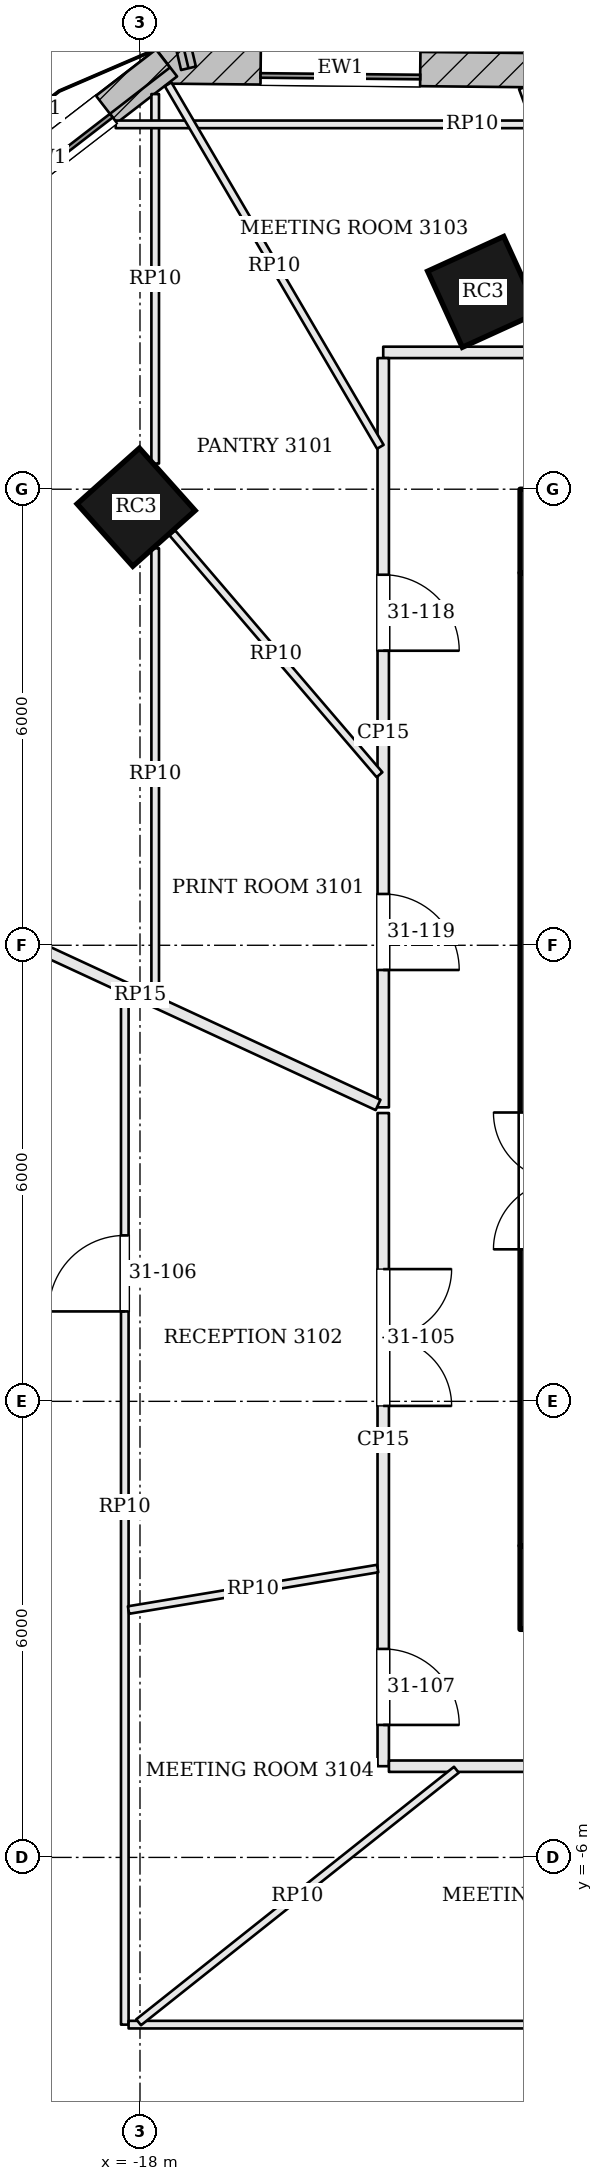
"""IFC4 building model, lengths in metres.
Left out: names, types, materials, properties, quantities, classifications, styles, units other than length and angle.
Written with IfcOpenShell. Run it as: python <this file> out.ifc"""

import sys

from ifc_helpers import new_model, si_unit, direction, frame, frame_2d, origin, origin_2d, place, context, subcontext, project, spatial, rectangle, extrude, element, fill, save


model = new_model("IFC4")
c1 = context("Model", 3, precision=1e-05, world=origin(), true_north=direction((0.0, 1.0)))
c2 = subcontext(c1, "Body", "Model", "MODEL_VIEW")
j1 = project(units=[si_unit("LENGTHUNIT", "METRE"), si_unit("PLANEANGLEUNIT", "RADIAN")], contexts=[c1])
p1 = place(None, origin())
s1 = spatial("IfcSite", under=j1, at=p1, CompositionType="ELEMENT")
p2 = place(p1, origin())
s2 = spatial("IfcBuilding", under=s1, at=p2, CompositionType="ELEMENT")
p3 = place(p2, frame((0.0, 0.0, 130.5)))
s3 = spatial("IfcBuildingStorey", under=s2, at=p3, CompositionType="ELEMENT", Elevation=130.5)
p4 = place(p3, frame((-13.0, 11.45, 0.0), z_axis=(0.0, 0.0, 1.0), x_axis=(1.0, 0.0, 0.0)))
e1 = element("IfcWall", 1, at=p4, inside=s3, PredefinedType="SHEAR", context=c2, shape_type="SweptSolid", body=[
    extrude(rectangle(XDim=26.0, YDim=1.1, at=frame_2d((13.0, 0.0))), origin(), (0.0, 0.0, 1.0), 3.9),
])
p5 = place(p4, frame((9.65, 0.0, 0.0)))
e2 = element("IfcOpeningElement", 2, at=p5, cuts=e1, PredefinedType="OPENING", context=c2, shape_type="SweptSolid", body=[
    extrude(rectangle(XDim=1.0, YDim=2.1, at=frame_2d((0.5, 1.05))), frame((0.0, 0.56, 0.0), z_axis=(0.0, -1.0, 0.0), x_axis=(1.0, 0.0, 0.0)), (0.0, 0.0, 1.0), 1.12),
])
p6 = place(p4, frame((12.675, 0.0, 0.0)))
e3 = element("IfcOpeningElement", 3, at=p6, cuts=e1, PredefinedType="OPENING", context=c2, shape_type="SweptSolid", body=[
    extrude(rectangle(XDim=0.7, YDim=2.1, at=frame_2d((0.35, 1.05))), frame((0.0, 0.56, 0.0), z_axis=(0.0, -1.0, 0.0), x_axis=(1.0, 0.0, 0.0)), (0.0, 0.0, 1.0), 1.12),
])
p7 = place(p4, frame((14.725, 0.0, 0.0)))
e4 = element("IfcOpeningElement", 4, at=p7, cuts=e1, PredefinedType="OPENING", context=c2, shape_type="SweptSolid", body=[
    extrude(rectangle(XDim=0.7, YDim=2.1, at=frame_2d((0.35, 1.05))), frame((0.0, 0.56, 0.0), z_axis=(0.0, -1.0, 0.0), x_axis=(1.0, 0.0, 0.0)), (0.0, 0.0, 1.0), 1.12),
])
p8 = place(p4, frame((16.6, 0.0, 0.0)))
e5 = element("IfcOpeningElement", 5, at=p8, cuts=e1, PredefinedType="OPENING", context=c2, shape_type="SweptSolid", body=[
    extrude(rectangle(XDim=1.0, YDim=2.1, at=frame_2d((0.5, 1.05))), frame((0.0, 0.56, 0.0), z_axis=(0.0, -1.0, 0.0), x_axis=(1.0, 0.0, 0.0)), (0.0, 0.0, 1.0), 1.12),
])
p9 = place(p3, frame((-13.0, -2.45, 0.0), z_axis=(0.0, 0.0, 1.0), x_axis=(1.0, 0.0, 0.0)))
e6 = element("IfcWall", 6, at=p9, inside=s3, PredefinedType="SHEAR", context=c2, shape_type="SweptSolid", body=[
    extrude(rectangle(XDim=26.0, YDim=1.1, at=frame_2d((13.0, 0.0))), origin(), (0.0, 0.0, 1.0), 3.9),
])
p10 = place(p9, frame((9.2, 0.0, 0.0)))
e7 = element("IfcOpeningElement", 7, at=p10, cuts=e6, PredefinedType="OPENING", context=c2, shape_type="SweptSolid", body=[
    extrude(rectangle(XDim=0.9, YDim=2.1, at=frame_2d((0.45, 1.05))), frame((0.0, 0.56, 0.0), z_axis=(0.0, -1.0, 0.0), x_axis=(1.0, 0.0, 0.0)), (0.0, 0.0, 1.0), 1.12),
])
p11 = place(p9, frame((12.3, 0.0, 0.0)))
e8 = element("IfcOpeningElement", 8, at=p11, cuts=e6, PredefinedType="OPENING", context=c2, shape_type="SweptSolid", body=[
    extrude(rectangle(XDim=0.9, YDim=2.1, at=frame_2d((0.45, 1.05))), frame((0.0, 0.56, 0.0), z_axis=(0.0, -1.0, 0.0), x_axis=(1.0, 0.0, 0.0)), (0.0, 0.0, 1.0), 1.12),
])
p12 = place(p9, frame((14.7, 0.0, 0.0)))
e9 = element("IfcOpeningElement", 9, at=p12, cuts=e6, PredefinedType="OPENING", context=c2, shape_type="SweptSolid", body=[
    extrude(rectangle(XDim=1.0, YDim=2.1, at=frame_2d((0.5, 1.05))), frame((0.0, 0.56, 0.0), z_axis=(0.0, -1.0, 0.0), x_axis=(1.0, 0.0, 0.0)), (0.0, 0.0, 1.0), 1.12),
])
p13 = place(p9, frame((16.55, 0.0, 0.0)))
e10 = element("IfcOpeningElement", 10, at=p13, cuts=e6, PredefinedType="OPENING", context=c2, shape_type="SweptSolid", body=[
    extrude(rectangle(XDim=0.9, YDim=2.1, at=frame_2d((0.45, 1.05))), frame((0.0, 0.56, 0.0), z_axis=(0.0, -1.0, 0.0), x_axis=(1.0, 0.0, 0.0)), (0.0, 0.0, 1.0), 1.12),
])
p14 = place(p3, frame((-12.45, -1.9, 0.0), z_axis=(0.0, 0.0, 1.0), x_axis=(0.0, 1.0, 0.0)))
e11 = element("IfcWall", 11, at=p14, inside=s3, PredefinedType="SHEAR", context=c2, shape_type="SweptSolid", body=[
    extrude(rectangle(XDim=12.8, YDim=1.1, at=frame_2d((6.4, 0.0))), origin(), (0.0, 0.0, 1.0), 3.9),
])
p15 = place(p14, frame((3.9, 0.0, 0.0)))
e12 = element("IfcOpeningElement", 12, at=p15, cuts=e11, PredefinedType="OPENING", context=c2, shape_type="SweptSolid", body=[
    extrude(rectangle(XDim=1.8, YDim=2.1, at=frame_2d((0.9, 1.05))), frame((0.0, 0.56, 0.0), z_axis=(0.0, -1.0, 0.0), x_axis=(1.0, 0.0, 0.0)), (0.0, 0.0, 1.0), 1.12),
])
for number, where, z_axis, x_axis in (
    (13, (-13.487, 14.596, 0.0), (0.0, 0.0, 1.0), (-0.91, -0.415, 0.0)),
    (14, (-18.051, 11.763, 0.0), (0.0, 0.0, 1.0), (-0.746, -0.666, 0.0)),
):
    element("IfcColumn", number, at=place(p3, frame(where, z_axis=z_axis, x_axis=x_axis)), inside=s3, PredefinedType="COLUMN", context=c2, shape_type="SweptSolid", body=[
        extrude(rectangle(XDim=1.1, YDim=1.1, at=origin_2d()), origin(), (0.0, 0.0, 1.0), 3.9),
    ])
p16 = place(p3, frame((-8.807, 17.008, 0.0), z_axis=(0.0, 0.0, 1.0), x_axis=(-0.992654419289, 0.120984312483, 0.0)))
e15 = element("IfcWall", 15, at=p16, inside=s3, PredefinedType="SOLIDWALL", context=c2, shape_type="SweptSolid", body=[
    extrude(rectangle(XDim=4.187, YDim=0.45, at=frame_2d((2.094, 0.0))), origin(), (0.0, 0.0, 1.0), 3.7),
])
p17 = place(p16, frame((1.044, 0.0, 0.9)))
e16 = element("IfcOpeningElement", 16, at=p17, cuts=e15, PredefinedType="OPENING", context=c2, shape_type="SweptSolid", body=[
    extrude(rectangle(XDim=2.1, YDim=2.3, at=frame_2d((1.05, 1.15))), frame((0.0, 0.235, 0.0), z_axis=(0.0, -1.0, 0.0), x_axis=(1.0, 0.0, 0.0)), (0.0, 0.0, 1.0), 0.47),
])
p18 = place(p3, frame((-12.939, 17.514, 0.0), z_axis=(0.0, 0.0, 1.0), x_axis=(-0.999950280333, 0.00997180335, 0.0)))
e17 = element("IfcWall", 17, at=p18, inside=s3, PredefinedType="SOLIDWALL", context=c2, shape_type="SweptSolid", body=[
    extrude(rectangle(XDim=4.848, YDim=0.45, at=frame_2d((2.424, 0.0))), origin(), (0.0, 0.0, 1.0), 3.7),
])
p19 = place(p18, frame((1.374, 0.0, 0.9)))
e18 = element("IfcOpeningElement", 18, at=p19, cuts=e17, PredefinedType="OPENING", context=c2, shape_type="SweptSolid", body=[
    extrude(rectangle(XDim=2.1, YDim=2.3, at=frame_2d((1.05, 1.15))), frame((0.0, 0.235, 0.0), z_axis=(0.0, -1.0, 0.0), x_axis=(1.0, 0.0, 0.0)), (0.0, 0.0, 1.0), 0.47),
])
p20 = place(p3, frame((-17.649, 17.609, 0.0), z_axis=(0.0, 0.0, 1.0), x_axis=(-0.791693388686, -0.610918634771, 0.0)))
e19 = element("IfcWall", 19, at=p20, inside=s3, PredefinedType="SOLIDWALL", context=c2, shape_type="SweptSolid", body=[
    extrude(rectangle(XDim=4.1, YDim=0.45, at=frame_2d((2.05, 0.0))), origin(), (0.0, 0.0, 1.0), 3.7),
])
p21 = place(p20, frame((1.0, 0.0, 0.9)))
e20 = element("IfcOpeningElement", 20, at=p21, cuts=e19, PredefinedType="OPENING", context=c2, shape_type="SweptSolid", body=[
    extrude(rectangle(XDim=2.1, YDim=2.3, at=frame_2d((1.05, 1.15))), frame((0.0, 0.235, 0.0), z_axis=(0.0, -1.0, 0.0), x_axis=(1.0, 0.0, 0.0)), (0.0, 0.0, 1.0), 0.47),
])
p22 = place(p3, frame((-17.362, 17.538, 0.0), z_axis=(0.0, 0.0, 1.0), x_axis=(-0.230469860183, 0.973079464148, 0.0)))
e21 = element("IfcWall", 21, at=p22, inside=s3, PredefinedType="SOLIDWALL", context=c2, shape_type="SweptSolid", body=[
    extrude(rectangle(XDim=1.75, YDim=0.2, at=frame_2d((0.875, 0.0))), origin(), (0.0, 0.0, 1.0), 3.7),
])
p23 = place(p3, frame((-17.698, 17.666, 3.9), z_axis=(0.0, 0.0, 1.0), x_axis=(-0.791652356246, -0.610971805282, 0.0)))
e22 = element("IfcWall", 22, at=p23, inside=s3, PredefinedType="PARAPET", context=c2, shape_type="SweptSolid", body=[
    extrude(rectangle(XDim=3.974, YDim=0.3, at=frame_2d((1.987, 0.0))), origin(), (0.0, 0.0, 1.0), 1.1),
])
p24 = place(p3, frame((5.559, 13.8, 0.0), z_axis=(0.0, 0.0, 1.0), x_axis=(-1.0, 0.0, 0.0)))
e23 = element("IfcWall", 23, at=p24, inside=s3, PredefinedType="PARTITIONING", context=c2, shape_type="SweptSolid", body=[
    extrude(rectangle(XDim=20.359, YDim=0.15, at=frame_2d((10.18, 0.0))), origin(), (0.0, 0.0, 1.0), 3.198),
])
p25 = place(p24, frame((3.204, 0.0, 0.0)))
e24 = element("IfcOpeningElement", 24, at=p25, cuts=e23, PredefinedType="OPENING", context=c2, shape_type="SweptSolid", body=[
    extrude(rectangle(XDim=1.8, YDim=2.1, at=frame_2d((0.9, 1.05))), frame((0.0, 0.085, 0.0), z_axis=(0.0, -1.0, 0.0), x_axis=(1.0, 0.0, 0.0)), (0.0, 0.0, 1.0), 0.17),
])
p26 = place(p24, frame((8.995, 0.0, 0.0)))
e25 = element("IfcOpeningElement", 25, at=p26, cuts=e23, PredefinedType="OPENING", context=c2, shape_type="SweptSolid", body=[
    extrude(rectangle(XDim=1.0, YDim=2.4, at=frame_2d((0.5, 1.2))), frame((0.0, 0.085, 0.0), z_axis=(0.0, -1.0, 0.0), x_axis=(1.0, 0.0, 0.0)), (0.0, 0.0, 1.0), 0.17),
])
p27 = place(p24, frame((13.511, 0.0, 0.0)))
e26 = element("IfcOpeningElement", 26, at=p27, cuts=e23, PredefinedType="OPENING", context=c2, shape_type="SweptSolid", body=[
    extrude(rectangle(XDim=1.0, YDim=2.4, at=frame_2d((0.5, 1.2))), frame((0.0, 0.085, 0.0), z_axis=(0.0, -1.0, 0.0), x_axis=(1.0, 0.0, 0.0)), (0.0, 0.0, 1.0), 0.17),
])
p28 = place(p24, frame((17.45, 0.0, 0.0)))
e27 = element("IfcOpeningElement", 27, at=p28, cuts=e23, PredefinedType="OPENING", context=c2, shape_type="SweptSolid", body=[
    extrude(rectangle(XDim=0.8, YDim=2.1, at=frame_2d((0.4, 1.05))), frame((0.0, 0.085, 0.0), z_axis=(0.0, -1.0, 0.0), x_axis=(1.0, 0.0, 0.0)), (0.0, 0.0, 1.0), 0.17),
])
p29 = place(p3, frame((-14.8, 13.725, 0.0), z_axis=(0.0, 0.0, 1.0), x_axis=(0.0, -1.0, 0.0)))
e28 = element("IfcWall", 28, at=p29, inside=s3, PredefinedType="PARTITIONING", context=c2, shape_type="SweptSolid", body=[
    extrude(rectangle(XDim=9.857, YDim=0.15, at=frame_2d((4.929, 0.0))), origin(), (0.0, 0.0, 1.0), 3.198),
])
p30 = place(p29, frame((2.85, 0.0, 0.0)))
e29 = element("IfcOpeningElement", 29, at=p30, cuts=e28, PredefinedType="OPENING", context=c2, shape_type="SweptSolid", body=[
    extrude(rectangle(XDim=1.0, YDim=2.1, at=frame_2d((0.5, 1.05))), frame((0.0, 0.085, 0.0), z_axis=(0.0, -1.0, 0.0), x_axis=(1.0, 0.0, 0.0)), (0.0, 0.0, 1.0), 0.17),
])
p31 = place(p29, frame((7.05, 0.0, 0.0)))
e30 = element("IfcOpeningElement", 30, at=p31, cuts=e28, PredefinedType="OPENING", context=c2, shape_type="SweptSolid", body=[
    extrude(rectangle(XDim=1.0, YDim=2.1, at=frame_2d((0.5, 1.05))), frame((0.0, 0.085, 0.0), z_axis=(0.0, -1.0, 0.0), x_axis=(1.0, 0.0, 0.0)), (0.0, 0.0, 1.0), 0.17),
])
p32 = place(p3, frame((-21.125, 6.795, 0.0), z_axis=(0.0, 0.0, 1.0), x_axis=(0.907525653009, -0.419996653713, 0.0)))
e31 = element("IfcWall", 31, at=p32, inside=s3, PredefinedType="PARTITIONING", context=c2, shape_type="SweptSolid", body=[
    extrude(rectangle(XDim=6.894, YDim=0.15, at=frame_2d((3.447, 0.0))), origin(), (0.0, 0.0, 1.0), 3.198),
])
p33 = place(p3, frame((-14.8, 3.793, 0.0), z_axis=(0.0, 0.0, 1.0), x_axis=(0.0, -1.0, 0.0)))
e32 = element("IfcWall", 32, at=p33, inside=s3, PredefinedType="PARTITIONING", context=c2, shape_type="SweptSolid", body=[
    extrude(rectangle(XDim=8.593, YDim=0.15, at=frame_2d((4.296, 0.0))), origin(), (0.0, 0.0, 1.0), 3.198),
])
p34 = place(p33, frame((2.053, 0.0, 0.0)))
e33 = element("IfcOpeningElement", 33, at=p34, cuts=e32, PredefinedType="OPENING", context=c2, shape_type="SweptSolid", body=[
    extrude(rectangle(XDim=1.8, YDim=2.1, at=frame_2d((0.9, 1.05))), frame((0.0, 0.085, 0.0), z_axis=(0.0, -1.0, 0.0), x_axis=(1.0, 0.0, 0.0)), (0.0, 0.0, 1.0), 0.17),
])
p35 = place(p33, frame((7.05, 0.0, 0.0)))
e34 = element("IfcOpeningElement", 34, at=p35, cuts=e32, PredefinedType="OPENING", context=c2, shape_type="SweptSolid", body=[
    extrude(rectangle(XDim=1.0, YDim=2.4, at=frame_2d((0.5, 1.2))), frame((0.0, 0.085, 0.0), z_axis=(0.0, -1.0, 0.0), x_axis=(1.0, 0.0, 0.0)), (0.0, 0.0, 1.0), 0.17),
])
p36 = place(p3, frame((-14.725, -4.8, 0.0), z_axis=(0.0, 0.0, 1.0), x_axis=(1.0, 0.0, 0.0)))
e35 = element("IfcWall", 35, at=p36, inside=s3, PredefinedType="PARTITIONING", context=c2, shape_type="SweptSolid", body=[
    extrude(rectangle(XDim=10.185, YDim=0.15, at=frame_2d((5.092, 0.0))), origin(), (0.0, 0.0, 1.0), 3.198),
])
p37 = place(p36, frame((3.093, 0.0, 0.0)))
e36 = element("IfcOpeningElement", 36, at=p37, cuts=e35, PredefinedType="OPENING", context=c2, shape_type="SweptSolid", body=[
    extrude(rectangle(XDim=1.0, YDim=2.4, at=frame_2d((0.5, 1.2))), frame((0.0, 0.085, 0.0), z_axis=(0.0, -1.0, 0.0), x_axis=(1.0, 0.0, 0.0)), (0.0, 0.0, 1.0), 0.17),
])
p38 = place(p3, frame((-17.8, 5.278, 0.0), z_axis=(0.0, 0.0, 1.0), x_axis=(0.0, 1.0, 0.0)))
e37 = element("IfcWall", 37, at=p38, inside=s3, PredefinedType="PARTITIONING", context=c2, shape_type="SweptSolid", body=[
    extrude(rectangle(XDim=5.945, YDim=0.1, at=frame_2d((2.972, 0.0))), origin(), (0.0, 0.0, 1.0), 3.184),
])
p39 = place(p3, frame((-17.8, 12.337, 0.0), z_axis=(0.0, 0.0, 1.0), x_axis=(0.0, 1.0, 0.0)))
e38 = element("IfcWall", 38, at=p39, inside=s3, PredefinedType="PARTITIONING", context=c2, shape_type="SweptSolid", body=[
    extrude(rectangle(XDim=4.861, YDim=0.1, at=frame_2d((2.431, 0.0))), origin(), (0.0, 0.0, 1.0), 3.184),
])
p40 = place(p3, frame((-18.319, 16.8, 0.0), z_axis=(0.0, 0.0, 1.0), x_axis=(1.0, 0.0, 0.0)))
e39 = element("IfcWall", 39, at=p40, inside=s3, PredefinedType="PARTITIONING", context=c2, shape_type="SweptSolid", body=[
    extrude(rectangle(XDim=9.381, YDim=0.1, at=frame_2d((4.69, 0.0))), origin(), (0.0, 0.0, 1.0), 3.184),
])
p41 = place(p3, frame((-11.707, 13.87, 0.0), z_axis=(0.0, 0.0, 1.0), x_axis=(-0.346436838334, 0.938073300465, 0.0)))
e40 = element("IfcWall", 40, at=p41, inside=s3, PredefinedType="PARTITIONING", context=c2, shape_type="SweptSolid", body=[
    extrude(rectangle(XDim=3.634, YDim=0.1, at=frame_2d((1.817, 0.0))), origin(), (0.0, 0.0, 1.0), 3.184),
])
p42 = place(p3, frame((-14.838, 12.558, 0.0), z_axis=(0.0, 0.0, 1.0), x_axis=(-0.505293152316, 0.862947756369, 0.0)))
e41 = element("IfcWall", 41, at=p42, inside=s3, PredefinedType="PARTITIONING", context=c2, shape_type="SweptSolid", body=[
    extrude(rectangle(XDim=5.526, YDim=0.1, at=frame_2d((2.763, 0.0))), origin(), (0.0, 0.0, 1.0), 3.184),
])
p43 = place(p3, frame((-14.849, 8.244, 0.0), z_axis=(0.0, 0.0, 1.0), x_axis=(-0.650724168588, 0.759314201379, 0.0)))
e42 = element("IfcWall", 42, at=p43, inside=s3, PredefinedType="PARTITIONING", context=c2, shape_type="SweptSolid", body=[
    extrude(rectangle(XDim=4.188, YDim=0.1, at=frame_2d((2.094, 0.0))), origin(), (0.0, 0.0, 1.0), 3.184),
])
p44 = place(p3, frame((-18.2, -8.2, 0.0), z_axis=(0.0, 0.0, 1.0), x_axis=(0.0, 1.0, 0.0)))
e43 = element("IfcWall", 43, at=p44, inside=s3, PredefinedType="PARTITIONING", context=c2, shape_type="SweptSolid", body=[
    extrude(rectangle(XDim=13.619, YDim=0.1, at=frame_2d((6.81, 0.0))), origin(), (0.0, 0.0, 1.0), 3.184),
])
p45 = place(p44, frame((9.383, 0.0, 0.0)))
e44 = element("IfcOpeningElement", 44, at=p45, cuts=e43, PredefinedType="OPENING", context=c2, shape_type="SweptSolid", body=[
    extrude(rectangle(XDim=1.0, YDim=2.1, at=frame_2d((0.5, 1.05))), frame((0.0, 0.06, 0.0), z_axis=(0.0, -1.0, 0.0), x_axis=(1.0, 0.0, 0.0)), (0.0, 0.0, 1.0), 0.12),
])
p46 = place(p3, frame((-5.005, -8.2, 0.0), z_axis=(0.0, 0.0, 1.0), x_axis=(-1.0, 0.0, 0.0)))
e45 = element("IfcWall", 45, at=p46, inside=s3, PredefinedType="PARTITIONING", context=c2, shape_type="SweptSolid", body=[
    extrude(rectangle(XDim=13.145, YDim=0.1, at=frame_2d((6.572, 0.0))), origin(), (0.0, 0.0, 1.0), 3.184),
])
p47 = place(p46, frame((1.906, 0.0, 0.0)))
e46 = element("IfcOpeningElement", 46, at=p47, cuts=e45, PredefinedType="OPENING", context=c2, shape_type="SweptSolid", body=[
    extrude(rectangle(XDim=0.9, YDim=2.1, at=frame_2d((0.45, 1.05))), frame((0.0, 0.06, 0.0), z_axis=(0.0, -1.0, 0.0), x_axis=(1.0, 0.0, 0.0)), (0.0, 0.0, 1.0), 0.12),
])
p48 = place(p3, frame((-14.874, -2.2, 0.0), z_axis=(0.0, 0.0, 1.0), x_axis=(-0.986415765856, -0.164267881431, 0.0)))
e47 = element("IfcWall", 47, at=p48, inside=s3, PredefinedType="PARTITIONING", context=c2, shape_type="SweptSolid", body=[
    extrude(rectangle(XDim=3.322, YDim=0.1, at=frame_2d((1.661, 0.0))), origin(), (0.0, 0.0, 1.0), 3.184),
])
p49 = place(p3, frame((-13.838, -4.847, 0.0), z_axis=(0.0, 0.0, 1.0), x_axis=(-0.782880927661, -0.622171562437, 0.0)))
e48 = element("IfcWall", 48, at=p49, inside=s3, PredefinedType="PARTITIONING", context=c2, shape_type="SweptSolid", body=[
    extrude(rectangle(XDim=5.34, YDim=0.1, at=frame_2d((2.67, 0.0))), origin(), (0.0, 0.0, 1.0), 3.184),
])
p50 = place(p19, origin())
e49 = element("IfcWindow", 49, at=p50, inside=s3, PartitioningType="SINGLE_PANEL", PredefinedType="WINDOW", context=c2, shape_type="SweptSolid", body=[
    extrude(rectangle(XDim=2.1, YDim=2.3, at=frame_2d((1.05, 1.15))), frame((0.0, 0.135, 0.0), z_axis=(0.0, -1.0, 0.0), x_axis=(1.0, 0.0, 0.0)), (0.0, 0.0, 1.0), 0.06),
])
fill(e18, e49)
p51 = place(p21, origin())
e50 = element("IfcWindow", 50, at=p51, inside=s3, PartitioningType="SINGLE_PANEL", PredefinedType="WINDOW", context=c2, shape_type="SweptSolid", body=[
    extrude(rectangle(XDim=2.1, YDim=2.3, at=frame_2d((1.05, 1.15))), frame((0.0, 0.135, 0.0), z_axis=(0.0, -1.0, 0.0), x_axis=(1.0, 0.0, 0.0)), (0.0, 0.0, 1.0), 0.06),
])
fill(e20, e50)
p52 = place(p34, origin())
e51 = element("IfcDoor", 51, at=p52, inside=s3, OperationType="DOUBLE_DOOR_SINGLE_SWING", PredefinedType="DOOR", context=c2, shape_type="SweptSolid", body=[
    extrude(rectangle(XDim=1.8, YDim=2.1, at=frame_2d((0.9, 1.05))), frame((0.0, 0.025, 0.0), z_axis=(0.0, -1.0, 0.0), x_axis=(1.0, 0.0, 0.0)), (0.0, 0.0, 1.0), 0.05),
])
fill(e33, e51)
p53 = place(p45, origin())
e52 = element("IfcDoor", 52, at=p53, inside=s3, OperationType="SINGLE_SWING_LEFT", PredefinedType="DOOR", context=c2, shape_type="SweptSolid", body=[
    extrude(rectangle(XDim=1.0, YDim=2.1, at=frame_2d((0.5, 1.05))), frame((0.0, 0.025, 0.0), z_axis=(0.0, -1.0, 0.0), x_axis=(1.0, 0.0, 0.0)), (0.0, 0.0, 1.0), 0.05),
])
fill(e44, e52)
p54 = place(p35, origin())
e53 = element("IfcDoor", 53, at=p54, inside=s3, OperationType="SINGLE_SWING_RIGHT", PredefinedType="DOOR", context=c2, shape_type="SweptSolid", body=[
    extrude(rectangle(XDim=1.0, YDim=2.4, at=frame_2d((0.5, 1.2))), frame((0.0, 0.025, 0.0), z_axis=(0.0, -1.0, 0.0), x_axis=(1.0, 0.0, 0.0)), (0.0, 0.0, 1.0), 0.05),
])
fill(e34, e53)
p55 = place(p30, origin())
e54 = element("IfcDoor", 54, at=p55, inside=s3, OperationType="SINGLE_SWING_RIGHT", PredefinedType="DOOR", context=c2, shape_type="SweptSolid", body=[
    extrude(rectangle(XDim=1.0, YDim=2.1, at=frame_2d((0.5, 1.05))), frame((0.0, 0.025, 0.0), z_axis=(0.0, -1.0, 0.0), x_axis=(1.0, 0.0, 0.0)), (0.0, 0.0, 1.0), 0.05),
])
fill(e29, e54)
p56 = place(p31, origin())
e55 = element("IfcDoor", 55, at=p56, inside=s3, OperationType="SINGLE_SWING_RIGHT", PredefinedType="DOOR", context=c2, shape_type="SweptSolid", body=[
    extrude(rectangle(XDim=1.0, YDim=2.1, at=frame_2d((0.5, 1.05))), frame((0.0, 0.025, 0.0), z_axis=(0.0, -1.0, 0.0), x_axis=(1.0, 0.0, 0.0)), (0.0, 0.0, 1.0), 0.05),
])
fill(e30, e55)
save(model, sys.argv[1])
